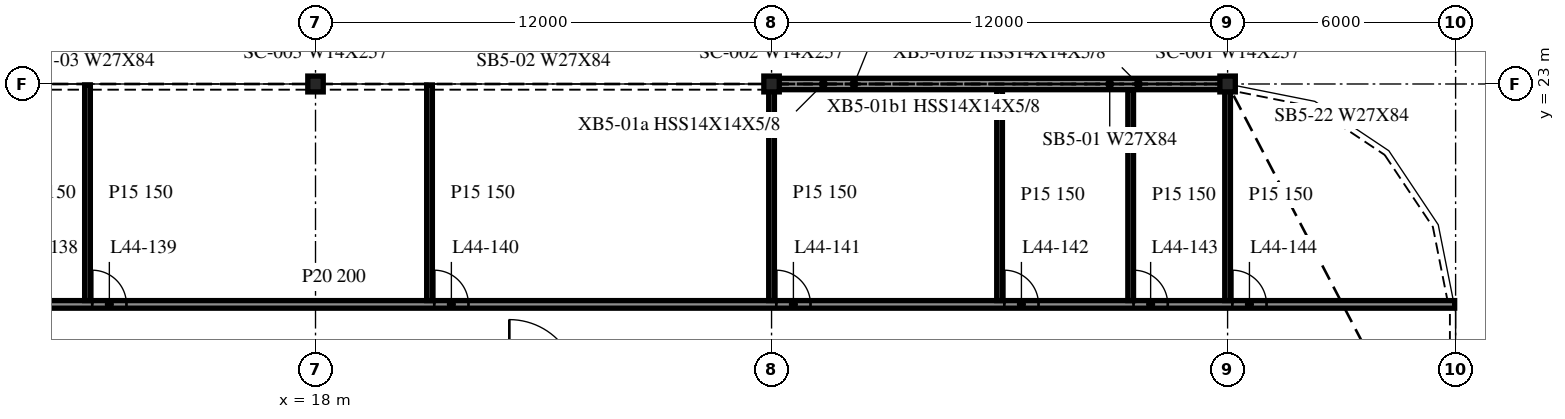
"""IFC4 building model, lengths in metres.
Left out: names, types, materials, properties, quantities, classifications, styles, units other than length and angle.
Written with IfcOpenShell. Run it as: python <this file> out.ifc"""

import sys

from ifc_helpers import new_model, si_unit, direction, frame, frame_2d, origin, origin_2d, place, context, subcontext, project, spatial, rectangle, i_section, extrude, element, fill, save


model = new_model("IFC4")
c1 = context("Model", 3, precision=1e-05, world=origin(), true_north=direction((0.0, 1.0)))
c2 = subcontext(c1, "Body", "Model", "MODEL_VIEW")
j1 = project(units=[si_unit("LENGTHUNIT", "METRE"), si_unit("PLANEANGLEUNIT", "RADIAN")], contexts=[c1])
p1 = place(None, origin())
s1 = spatial("IfcSite", under=j1, at=p1, CompositionType="ELEMENT")
p2 = place(p1, origin())
s2 = spatial("IfcBuilding", under=s1, at=p2, CompositionType="ELEMENT")
p3 = place(p2, frame((0.0, 0.0, 185.8)))
s3 = spatial("IfcBuildingStorey", under=s2, at=p3, CompositionType="ELEMENT", Elevation=185.8)
for number, where, z_axis, x_axis in (
    (1, (42.0, 23.0, -0.34), (0.0, 0.0, 1.0), (1.0, 0.0, 0.0)),
    (2, (30.0, 23.0, -0.34), (0.0, 0.0, 1.0), (1.0, 0.0, 0.0)),
    (3, (18.0, 23.0, -0.34), (0.0, 0.0, 1.0), (1.0, 0.0, 0.0)),
):
    element("IfcColumn", number, at=place(p3, frame(where, z_axis=z_axis, x_axis=x_axis)), inside=s3, PredefinedType="COLUMN", context=c2, shape_type="SweptSolid", body=[
        extrude(i_section(OverallWidth=0.406, OverallDepth=0.417, WebThickness=0.03, FlangeThickness=0.048, at=origin_2d()), origin(), (0.0, 0.0, 1.0), 3.74),
    ])
p4 = place(p3, frame((41.985, 23.0, 0.0), z_axis=(0.0, 0.0, 1.0), x_axis=(-1.0, 0.0, 0.0)))
e4 = element("IfcWall", 4, at=p4, inside=s3, PredefinedType="NOTDEFINED", context=c2, shape_type="SweptSolid", body=[
    extrude(rectangle(XDim=11.97, YDim=0.3, at=frame_2d((5.985, 0.0))), origin(), (0.0, 0.0, 1.0), 3.4),
])
p5 = place(p3, frame((-47.975, 17.2, 0.0), z_axis=(0.0, 0.0, 1.0), x_axis=(1.0, 0.0, 0.0)))
e5 = element("IfcWall", 5, at=p5, inside=s3, PredefinedType="PARTITIONING", context=c2, shape_type="SweptSolid", body=[
    extrude(rectangle(XDim=95.95, YDim=0.2, at=frame_2d((47.975, 0.0))), origin(), (0.0, 0.0, 1.0), 3.4),
])
p6 = place(p5, frame((7.7, 0.0, 0.0)))
e6 = element("IfcOpeningElement", 6, at=p6, cuts=e5, PredefinedType="OPENING", context=c2, shape_type="SweptSolid", body=[
    extrude(rectangle(XDim=0.9, YDim=2.1, at=frame_2d((0.45, 1.05))), frame((0.0, 0.11, 0.0), z_axis=(0.0, -1.0, 0.0), x_axis=(1.0, 0.0, 0.0)), (0.0, 0.0, 1.0), 0.22),
])
p7 = place(p5, frame((16.7, 0.0, 0.0)))
e7 = element("IfcOpeningElement", 7, at=p7, cuts=e5, PredefinedType="OPENING", context=c2, shape_type="SweptSolid", body=[
    extrude(rectangle(XDim=0.9, YDim=2.1, at=frame_2d((0.45, 1.05))), frame((0.0, 0.11, 0.0), z_axis=(0.0, -1.0, 0.0), x_axis=(1.0, 0.0, 0.0)), (0.0, 0.0, 1.0), 0.22),
])
p8 = place(p5, frame((22.7, 0.0, 0.0)))
e8 = element("IfcOpeningElement", 8, at=p8, cuts=e5, PredefinedType="OPENING", context=c2, shape_type="SweptSolid", body=[
    extrude(rectangle(XDim=0.9, YDim=2.1, at=frame_2d((0.45, 1.05))), frame((0.0, 0.11, 0.0), z_axis=(0.0, -1.0, 0.0), x_axis=(1.0, 0.0, 0.0)), (0.0, 0.0, 1.0), 0.22),
])
p9 = place(p5, frame((26.1, 0.0, 0.0)))
e9 = element("IfcOpeningElement", 9, at=p9, cuts=e5, PredefinedType="OPENING", context=c2, shape_type="SweptSolid", body=[
    extrude(rectangle(XDim=0.9, YDim=2.1, at=frame_2d((0.45, 1.05))), frame((0.0, 0.11, 0.0), z_axis=(0.0, -1.0, 0.0), x_axis=(1.0, 0.0, 0.0)), (0.0, 0.0, 1.0), 0.22),
])
p10 = place(p5, frame((28.7, 0.0, 0.0)))
e10 = element("IfcOpeningElement", 10, at=p10, cuts=e5, PredefinedType="OPENING", context=c2, shape_type="SweptSolid", body=[
    extrude(rectangle(XDim=0.9, YDim=2.1, at=frame_2d((0.45, 1.05))), frame((0.0, 0.11, 0.0), z_axis=(0.0, -1.0, 0.0), x_axis=(1.0, 0.0, 0.0)), (0.0, 0.0, 1.0), 0.22),
])
p11 = place(p5, frame((37.7, 0.0, 0.0)))
e11 = element("IfcOpeningElement", 11, at=p11, cuts=e5, PredefinedType="OPENING", context=c2, shape_type="SweptSolid", body=[
    extrude(rectangle(XDim=0.9, YDim=2.1, at=frame_2d((0.45, 1.05))), frame((0.0, 0.11, 0.0), z_axis=(0.0, -1.0, 0.0), x_axis=(1.0, 0.0, 0.0)), (0.0, 0.0, 1.0), 0.22),
])
p12 = place(p5, frame((46.7, 0.0, 0.0)))
e12 = element("IfcOpeningElement", 12, at=p12, cuts=e5, PredefinedType="OPENING", context=c2, shape_type="SweptSolid", body=[
    extrude(rectangle(XDim=0.9, YDim=2.1, at=frame_2d((0.45, 1.05))), frame((0.0, 0.11, 0.0), z_axis=(0.0, -1.0, 0.0), x_axis=(1.0, 0.0, 0.0)), (0.0, 0.0, 1.0), 0.22),
])
p13 = place(p5, frame((48.1, 0.0, 0.0)))
e13 = element("IfcOpeningElement", 13, at=p13, cuts=e5, PredefinedType="OPENING", context=c2, shape_type="SweptSolid", body=[
    extrude(rectangle(XDim=0.9, YDim=2.1, at=frame_2d((0.45, 1.05))), frame((0.0, 0.11, 0.0), z_axis=(0.0, -1.0, 0.0), x_axis=(1.0, 0.0, 0.0)), (0.0, 0.0, 1.0), 0.22),
])
p14 = place(p5, frame((54.1, 0.0, 0.0)))
e14 = element("IfcOpeningElement", 14, at=p14, cuts=e5, PredefinedType="OPENING", context=c2, shape_type="SweptSolid", body=[
    extrude(rectangle(XDim=0.9, YDim=2.1, at=frame_2d((0.45, 1.05))), frame((0.0, 0.11, 0.0), z_axis=(0.0, -1.0, 0.0), x_axis=(1.0, 0.0, 0.0)), (0.0, 0.0, 1.0), 0.22),
])
p15 = place(p5, frame((57.5, 0.0, 0.0)))
e15 = element("IfcOpeningElement", 15, at=p15, cuts=e5, PredefinedType="OPENING", context=c2, shape_type="SweptSolid", body=[
    extrude(rectangle(XDim=0.9, YDim=2.1, at=frame_2d((0.45, 1.05))), frame((0.0, 0.11, 0.0), z_axis=(0.0, -1.0, 0.0), x_axis=(1.0, 0.0, 0.0)), (0.0, 0.0, 1.0), 0.22),
])
p16 = place(p5, frame((60.1, 0.0, 0.0)))
e16 = element("IfcOpeningElement", 16, at=p16, cuts=e5, PredefinedType="OPENING", context=c2, shape_type="SweptSolid", body=[
    extrude(rectangle(XDim=0.9, YDim=2.1, at=frame_2d((0.45, 1.05))), frame((0.0, 0.11, 0.0), z_axis=(0.0, -1.0, 0.0), x_axis=(1.0, 0.0, 0.0)), (0.0, 0.0, 1.0), 0.22),
])
p17 = place(p5, frame((69.1, 0.0, 0.0)))
e17 = element("IfcOpeningElement", 17, at=p17, cuts=e5, PredefinedType="OPENING", context=c2, shape_type="SweptSolid", body=[
    extrude(rectangle(XDim=0.9, YDim=2.1, at=frame_2d((0.45, 1.05))), frame((0.0, 0.11, 0.0), z_axis=(0.0, -1.0, 0.0), x_axis=(1.0, 0.0, 0.0)), (0.0, 0.0, 1.0), 0.22),
])
p18 = place(p5, frame((78.1, 0.0, 0.0)))
e18 = element("IfcOpeningElement", 18, at=p18, cuts=e5, PredefinedType="OPENING", context=c2, shape_type="SweptSolid", body=[
    extrude(rectangle(XDim=0.9, YDim=2.1, at=frame_2d((0.45, 1.05))), frame((0.0, 0.11, 0.0), z_axis=(0.0, -1.0, 0.0), x_axis=(1.0, 0.0, 0.0)), (0.0, 0.0, 1.0), 0.22),
])
p19 = place(p5, frame((84.1, 0.0, 0.0)))
e19 = element("IfcOpeningElement", 19, at=p19, cuts=e5, PredefinedType="OPENING", context=c2, shape_type="SweptSolid", body=[
    extrude(rectangle(XDim=0.9, YDim=2.1, at=frame_2d((0.45, 1.05))), frame((0.0, 0.11, 0.0), z_axis=(0.0, -1.0, 0.0), x_axis=(1.0, 0.0, 0.0)), (0.0, 0.0, 1.0), 0.22),
])
p20 = place(p5, frame((87.5, 0.0, 0.0)))
e20 = element("IfcOpeningElement", 20, at=p20, cuts=e5, PredefinedType="OPENING", context=c2, shape_type="SweptSolid", body=[
    extrude(rectangle(XDim=0.9, YDim=2.1, at=frame_2d((0.45, 1.05))), frame((0.0, 0.11, 0.0), z_axis=(0.0, -1.0, 0.0), x_axis=(1.0, 0.0, 0.0)), (0.0, 0.0, 1.0), 0.22),
])
p21 = place(p5, frame((90.1, 0.0, 0.0)))
e21 = element("IfcOpeningElement", 21, at=p21, cuts=e5, PredefinedType="OPENING", context=c2, shape_type="SweptSolid", body=[
    extrude(rectangle(XDim=0.9, YDim=2.1, at=frame_2d((0.45, 1.05))), frame((0.0, 0.11, 0.0), z_axis=(0.0, -1.0, 0.0), x_axis=(1.0, 0.0, 0.0)), (0.0, 0.0, 1.0), 0.22),
])
for number, where, z_axis, x_axis in (
    (22, (12.0, 17.3, 0.0), (0.0, 0.0, 1.0), (0.0, 1.0, 0.0)),
    (23, (21.0, 17.3, 0.0), (0.0, 0.0, 1.0), (0.0, 1.0, 0.0)),
    (24, (30.0, 17.3, 0.0), (0.0, 0.0, 1.0), (0.0, 1.0, 0.0)),
):
    element("IfcWall", number, at=place(p3, frame(where, z_axis=z_axis, x_axis=x_axis)), inside=s3, PredefinedType="PARTITIONING", context=c2, shape_type="SweptSolid", body=[
        extrude(rectangle(XDim=5.675, YDim=0.15, at=frame_2d((2.837, 0.0))), origin(), (0.0, 0.0, 1.0), 3.4),
    ])
for number, where, z_axis, x_axis in (
    (25, (36.0, 17.3, 0.0), (0.0, 0.0, 1.0), (0.0, 1.0, 0.0)),
    (26, (39.45, 17.3, 0.0), (0.0, 0.0, 1.0), (0.0, 1.0, 0.0)),
):
    element("IfcWall", number, at=place(p3, frame(where, z_axis=z_axis, x_axis=x_axis)), inside=s3, PredefinedType="PARTITIONING", context=c2, shape_type="SweptSolid", body=[
        extrude(rectangle(XDim=5.55, YDim=0.15, at=frame_2d((2.775, 0.0))), origin(), (0.0, 0.0, 1.0), 3.4),
    ])
p22 = place(p3, frame((42.0, 17.3, 0.0), z_axis=(0.0, 0.0, 1.0), x_axis=(0.0, 1.0, 0.0)))
e27 = element("IfcWall", 27, at=p22, inside=s3, PredefinedType="PARTITIONING", context=c2, shape_type="SweptSolid", body=[
    extrude(rectangle(XDim=5.547, YDim=0.15, at=frame_2d((2.773, 0.0))), origin(), (0.0, 0.0, 1.0), 3.4),
])
p23 = place(p16, origin())
e28 = element("IfcDoor", 28, at=p23, inside=s3, OperationType="SINGLE_SWING_RIGHT", PredefinedType="DOOR", context=c2, shape_type="SweptSolid", body=[
    extrude(rectangle(XDim=0.9, YDim=2.1, at=frame_2d((0.45, 1.05))), frame((0.0, 0.025, 0.0), z_axis=(0.0, -1.0, 0.0), x_axis=(1.0, 0.0, 0.0)), (0.0, 0.0, 1.0), 0.05),
])
fill(e16, e28)
p24 = place(p17, origin())
e29 = element("IfcDoor", 29, at=p24, inside=s3, OperationType="SINGLE_SWING_RIGHT", PredefinedType="DOOR", context=c2, shape_type="SweptSolid", body=[
    extrude(rectangle(XDim=0.9, YDim=2.1, at=frame_2d((0.45, 1.05))), frame((0.0, 0.025, 0.0), z_axis=(0.0, -1.0, 0.0), x_axis=(1.0, 0.0, 0.0)), (0.0, 0.0, 1.0), 0.05),
])
fill(e17, e29)
p25 = place(p18, origin())
e30 = element("IfcDoor", 30, at=p25, inside=s3, OperationType="SINGLE_SWING_RIGHT", PredefinedType="DOOR", context=c2, shape_type="SweptSolid", body=[
    extrude(rectangle(XDim=0.9, YDim=2.1, at=frame_2d((0.45, 1.05))), frame((0.0, 0.025, 0.0), z_axis=(0.0, -1.0, 0.0), x_axis=(1.0, 0.0, 0.0)), (0.0, 0.0, 1.0), 0.05),
])
fill(e18, e30)
p26 = place(p19, origin())
e31 = element("IfcDoor", 31, at=p26, inside=s3, OperationType="SINGLE_SWING_RIGHT", PredefinedType="DOOR", context=c2, shape_type="SweptSolid", body=[
    extrude(rectangle(XDim=0.9, YDim=2.1, at=frame_2d((0.45, 1.05))), frame((0.0, 0.025, 0.0), z_axis=(0.0, -1.0, 0.0), x_axis=(1.0, 0.0, 0.0)), (0.0, 0.0, 1.0), 0.05),
])
fill(e19, e31)
p27 = place(p20, origin())
e32 = element("IfcDoor", 32, at=p27, inside=s3, OperationType="SINGLE_SWING_RIGHT", PredefinedType="DOOR", context=c2, shape_type="SweptSolid", body=[
    extrude(rectangle(XDim=0.9, YDim=2.1, at=frame_2d((0.45, 1.05))), frame((0.0, 0.025, 0.0), z_axis=(0.0, -1.0, 0.0), x_axis=(1.0, 0.0, 0.0)), (0.0, 0.0, 1.0), 0.05),
])
fill(e20, e32)
p28 = place(p21, origin())
e33 = element("IfcDoor", 33, at=p28, inside=s3, OperationType="SINGLE_SWING_RIGHT", PredefinedType="DOOR", context=c2, shape_type="SweptSolid", body=[
    extrude(rectangle(XDim=0.9, YDim=2.1, at=frame_2d((0.45, 1.05))), frame((0.0, 0.025, 0.0), z_axis=(0.0, -1.0, 0.0), x_axis=(1.0, 0.0, 0.0)), (0.0, 0.0, 1.0), 0.05),
])
fill(e21, e33)
save(model, sys.argv[1])
